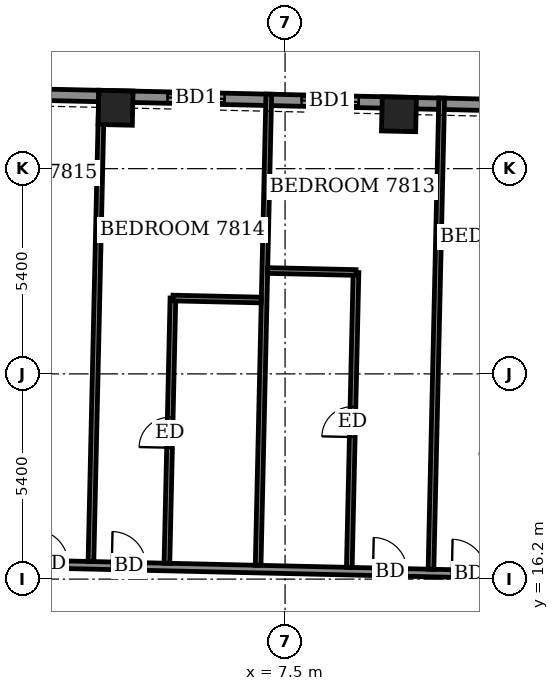
"""IFC4 building model, lengths in metres.
Left out: names, types, materials, properties, quantities, classifications, styles, units other than length and angle.
Written with IfcOpenShell. Run it as: python <this file> out.ifc"""

import sys

from ifc_helpers import new_model, si_unit, direction, frame, frame_2d, origin, origin_2d, place, context, subcontext, project, spatial, rectangle, extrude, element, fill, save


model = new_model("IFC4")
c1 = context("Model", 3, precision=1e-05, world=origin(), true_north=direction((0.0, 1.0)))
c2 = subcontext(c1, "Body", "Model", "MODEL_VIEW")
j1 = project(units=[si_unit("LENGTHUNIT", "METRE"), si_unit("PLANEANGLEUNIT", "RADIAN")], contexts=[c1])
p1 = place(None, origin())
s1 = spatial("IfcSite", under=j1, at=p1, CompositionType="ELEMENT")
p2 = place(p1, origin())
s2 = spatial("IfcBuilding", under=s1, at=p2, CompositionType="ELEMENT")
p3 = place(p2, frame((0.0, 0.0, 306.1)))
s3 = spatial("IfcBuildingStorey", under=s2, at=p3, CompositionType="ELEMENT", Elevation=306.1)
for number, where, z_axis, x_axis in (
    (1, (10.497, 28.432, -0.55), (0.0, 0.0, 1.0), (-1.0, 0.023, 0.0)),
    (2, (3.041, 28.602, -0.55), (0.0, 0.0, 1.0), (-1.0, 0.023, 0.0)),
):
    element("IfcColumn", number, at=place(p3, frame(where, z_axis=z_axis, x_axis=x_axis)), inside=s3, PredefinedType="COLUMN", context=c2, shape_type="SweptSolid", body=[
        extrude(rectangle(XDim=0.9, YDim=0.9, at=origin_2d()), origin(), (0.0, 0.0, 1.0), 3.6),
    ])
p4 = place(p3, frame((25.264, 28.397, 0.0), z_axis=(0.0, 0.0, 1.0), x_axis=(-0.999742391375, 0.022696935658, 0.0)))
e3 = element("IfcWall", 3, at=p4, inside=s3, PredefinedType="SOLIDWALL", context=c2, shape_type="SweptSolid", body=[
    extrude(rectangle(XDim=51.9, YDim=0.3, at=frame_2d((25.95, 0.0))), origin(), (0.0, 0.0, 1.0), 2.5),
])
p5 = place(p4, frame((1.898, 0.0, 0.0)))
e4 = element("IfcOpeningElement", 4, at=p5, cuts=e3, PredefinedType="OPENING", context=c2, shape_type="SweptSolid", body=[
    extrude(rectangle(XDim=1.5, YDim=2.4, at=frame_2d((0.75, 1.2))), frame((0.0, 0.16, 0.0), z_axis=(0.0, -1.0, 0.0), x_axis=(1.0, 0.0, 0.0)), (0.0, 0.0, 1.0), 0.32),
])
p6 = place(p4, frame((5.229, 0.0, 0.0)))
e5 = element("IfcOpeningElement", 5, at=p6, cuts=e3, PredefinedType="OPENING", context=c2, shape_type="SweptSolid", body=[
    extrude(rectangle(XDim=1.5, YDim=2.4, at=frame_2d((0.75, 1.2))), frame((0.0, 0.16, 0.0), z_axis=(0.0, -1.0, 0.0), x_axis=(1.0, 0.0, 0.0)), (0.0, 0.0, 1.0), 0.32),
])
p7 = place(p4, frame((10.7, 0.0, 0.0)))
e6 = element("IfcOpeningElement", 6, at=p7, cuts=e3, PredefinedType="OPENING", context=c2, shape_type="SweptSolid", body=[
    extrude(rectangle(XDim=1.5, YDim=2.4, at=frame_2d((0.75, 1.2))), frame((0.0, 0.16, 0.0), z_axis=(0.0, -1.0, 0.0), x_axis=(1.0, 0.0, 0.0)), (0.0, 0.0, 1.0), 0.32),
])
p8 = place(p4, frame((15.832, 0.0, 0.0)))
e7 = element("IfcOpeningElement", 7, at=p8, cuts=e3, PredefinedType="OPENING", context=c2, shape_type="SweptSolid", body=[
    extrude(rectangle(XDim=1.5, YDim=2.4, at=frame_2d((0.75, 1.2))), frame((0.0, 0.16, 0.0), z_axis=(0.0, -1.0, 0.0), x_axis=(1.0, 0.0, 0.0)), (0.0, 0.0, 1.0), 0.32),
])
p9 = place(p4, frame((19.361, 0.0, 0.0)))
e8 = element("IfcOpeningElement", 8, at=p9, cuts=e3, PredefinedType="OPENING", context=c2, shape_type="SweptSolid", body=[
    extrude(rectangle(XDim=1.5, YDim=2.4, at=frame_2d((0.75, 1.2))), frame((0.0, 0.16, 0.0), z_axis=(0.0, -1.0, 0.0), x_axis=(1.0, 0.0, 0.0)), (0.0, 0.0, 1.0), 0.32),
])
p10 = place(p4, frame((24.1, 0.0, 0.0)))
e9 = element("IfcOpeningElement", 9, at=p10, cuts=e3, PredefinedType="OPENING", context=c2, shape_type="SweptSolid", body=[
    extrude(rectangle(XDim=1.5, YDim=2.4, at=frame_2d((0.75, 1.2))), frame((0.0, 0.16, 0.0), z_axis=(0.0, -1.0, 0.0), x_axis=(1.0, 0.0, 0.0)), (0.0, 0.0, 1.0), 0.32),
])
p11 = place(p4, frame((27.539, 0.0, 0.0)))
e10 = element("IfcOpeningElement", 10, at=p11, cuts=e3, PredefinedType="OPENING", context=c2, shape_type="SweptSolid", body=[
    extrude(rectangle(XDim=1.5, YDim=2.4, at=frame_2d((0.75, 1.2))), frame((0.0, 0.16, 0.0), z_axis=(0.0, -1.0, 0.0), x_axis=(1.0, 0.0, 0.0)), (0.0, 0.0, 1.0), 0.32),
])
p12 = place(p4, frame((33.6, 0.0, 0.0)))
e11 = element("IfcOpeningElement", 11, at=p12, cuts=e3, PredefinedType="OPENING", context=c2, shape_type="SweptSolid", body=[
    extrude(rectangle(XDim=1.5, YDim=2.4, at=frame_2d((0.75, 1.2))), frame((0.0, 0.16, 0.0), z_axis=(0.0, -1.0, 0.0), x_axis=(1.0, 0.0, 0.0)), (0.0, 0.0, 1.0), 0.32),
])
p13 = place(p4, frame((38.643, 0.0, 0.0)))
e12 = element("IfcOpeningElement", 12, at=p13, cuts=e3, PredefinedType="OPENING", context=c2, shape_type="SweptSolid", body=[
    extrude(rectangle(XDim=1.5, YDim=2.4, at=frame_2d((0.75, 1.2))), frame((0.0, 0.16, 0.0), z_axis=(0.0, -1.0, 0.0), x_axis=(1.0, 0.0, 0.0)), (0.0, 0.0, 1.0), 0.32),
])
p14 = place(p4, frame((42.171, 0.0, 0.0)))
e13 = element("IfcOpeningElement", 13, at=p14, cuts=e3, PredefinedType="OPENING", context=c2, shape_type="SweptSolid", body=[
    extrude(rectangle(XDim=1.5, YDim=2.4, at=frame_2d((0.75, 1.2))), frame((0.0, 0.16, 0.0), z_axis=(0.0, -1.0, 0.0), x_axis=(1.0, 0.0, 0.0)), (0.0, 0.0, 1.0), 0.32),
])
p15 = place(p4, frame((47.637, 0.0, 0.9)))
e14 = element("IfcOpeningElement", 14, at=p15, cuts=e3, PredefinedType="OPENING", context=c2, shape_type="SweptSolid", body=[
    extrude(rectangle(XDim=2.4, YDim=1.5, at=frame_2d((1.2, 0.75))), frame((0.0, 0.16, 0.0), z_axis=(0.0, -1.0, 0.0), x_axis=(1.0, 0.0, 0.0)), (0.0, 0.0, 1.0), 0.32),
])
p16 = place(p3, frame((-30.652, 17.313, 0.0), z_axis=(0.0, 0.0, 1.0), x_axis=(0.999742623764, -0.02268669719, 0.0)))
e15 = element("IfcWall", 15, at=p16, inside=s3, PredefinedType="PARTITIONING", context=c2, shape_type="SweptSolid", body=[
    extrude(rectangle(XDim=58.8, YDim=0.2, at=frame_2d((29.4, 0.0))), origin(), (0.0, 0.0, 1.0), 3.05),
])
p17 = place(p16, frame((54.601, 0.0, 0.0)))
e16 = element("IfcOpeningElement", 16, at=p17, cuts=e15, PredefinedType="OPENING", context=c2, shape_type="SweptSolid", body=[
    extrude(rectangle(XDim=1.0, YDim=2.1, at=frame_2d((0.5, 1.05))), frame((0.0, 0.11, 0.0), z_axis=(0.0, -1.0, 0.0), x_axis=(1.0, 0.0, 0.0)), (0.0, 0.0, 1.0), 0.22),
])
p18 = place(p16, frame((49.35, 0.0, 0.0)))
e17 = element("IfcOpeningElement", 17, at=p18, cuts=e15, PredefinedType="OPENING", context=c2, shape_type="SweptSolid", body=[
    extrude(rectangle(XDim=0.9, YDim=2.1, at=frame_2d((0.45, 1.05))), frame((0.0, 0.11, 0.0), z_axis=(0.0, -1.0, 0.0), x_axis=(1.0, 0.0, 0.0)), (0.0, 0.0, 1.0), 0.22),
])
p19 = place(p16, frame((42.55, 0.0, 0.0)))
e18 = element("IfcOpeningElement", 18, at=p19, cuts=e15, PredefinedType="OPENING", context=c2, shape_type="SweptSolid", body=[
    extrude(rectangle(XDim=0.9, YDim=2.1, at=frame_2d((0.45, 1.05))), frame((0.0, 0.11, 0.0), z_axis=(0.0, -1.0, 0.0), x_axis=(1.0, 0.0, 0.0)), (0.0, 0.0, 1.0), 0.22),
])
p20 = place(p16, frame((40.475, 0.0, 0.0)))
e19 = element("IfcOpeningElement", 19, at=p20, cuts=e15, PredefinedType="OPENING", context=c2, shape_type="SweptSolid", body=[
    extrude(rectangle(XDim=0.9, YDim=2.1, at=frame_2d((0.45, 1.05))), frame((0.0, 0.11, 0.0), z_axis=(0.0, -1.0, 0.0), x_axis=(1.0, 0.0, 0.0)), (0.0, 0.0, 1.0), 0.22),
])
p21 = place(p16, frame((33.6, 0.0, 0.0)))
e20 = element("IfcOpeningElement", 20, at=p21, cuts=e15, PredefinedType="OPENING", context=c2, shape_type="SweptSolid", body=[
    extrude(rectangle(XDim=0.9, YDim=2.1, at=frame_2d((0.45, 1.05))), frame((0.0, 0.11, 0.0), z_axis=(0.0, -1.0, 0.0), x_axis=(1.0, 0.0, 0.0)), (0.0, 0.0, 1.0), 0.22),
])
p22 = place(p16, frame((31.55, 0.0, 0.0)))
e21 = element("IfcOpeningElement", 21, at=p22, cuts=e15, PredefinedType="OPENING", context=c2, shape_type="SweptSolid", body=[
    extrude(rectangle(XDim=0.9, YDim=2.1, at=frame_2d((0.45, 1.05))), frame((0.0, 0.11, 0.0), z_axis=(0.0, -1.0, 0.0), x_axis=(1.0, 0.0, 0.0)), (0.0, 0.0, 1.0), 0.22),
])
p23 = place(p16, frame((24.425, 0.0, 0.0)))
e22 = element("IfcOpeningElement", 22, at=p23, cuts=e15, PredefinedType="OPENING", context=c2, shape_type="SweptSolid", body=[
    extrude(rectangle(XDim=0.9, YDim=2.1, at=frame_2d((0.45, 1.05))), frame((0.0, 0.11, 0.0), z_axis=(0.0, -1.0, 0.0), x_axis=(1.0, 0.0, 0.0)), (0.0, 0.0, 1.0), 0.22),
])
p24 = place(p16, frame((22.05, 0.0, 0.0)))
e23 = element("IfcOpeningElement", 23, at=p24, cuts=e15, PredefinedType="OPENING", context=c2, shape_type="SweptSolid", body=[
    extrude(rectangle(XDim=0.9, YDim=2.1, at=frame_2d((0.45, 1.05))), frame((0.0, 0.11, 0.0), z_axis=(0.0, -1.0, 0.0), x_axis=(1.0, 0.0, 0.0)), (0.0, 0.0, 1.0), 0.22),
])
p25 = place(p16, frame((14.95, 0.0, 0.0)))
e24 = element("IfcOpeningElement", 24, at=p25, cuts=e15, PredefinedType="OPENING", context=c2, shape_type="SweptSolid", body=[
    extrude(rectangle(XDim=0.9, YDim=2.1, at=frame_2d((0.45, 1.05))), frame((0.0, 0.11, 0.0), z_axis=(0.0, -1.0, 0.0), x_axis=(1.0, 0.0, 0.0)), (0.0, 0.0, 1.0), 0.22),
])
p26 = place(p16, frame((12.525, 0.0, 0.0)))
e25 = element("IfcOpeningElement", 25, at=p26, cuts=e15, PredefinedType="OPENING", context=c2, shape_type="SweptSolid", body=[
    extrude(rectangle(XDim=0.9, YDim=2.1, at=frame_2d((0.45, 1.05))), frame((0.0, 0.11, 0.0), z_axis=(0.0, -1.0, 0.0), x_axis=(1.0, 0.0, 0.0)), (0.0, 0.0, 1.0), 0.22),
])
p27 = place(p16, frame((4.032, 0.0, 0.0)))
e26 = element("IfcOpeningElement", 26, at=p27, cuts=e15, PredefinedType="OPENING", context=c2, shape_type="SweptSolid", body=[
    extrude(rectangle(XDim=1.0, YDim=2.1, at=frame_2d((0.5, 1.05))), frame((0.0, 0.11, 0.0), z_axis=(0.0, -1.0, 0.0), x_axis=(1.0, 0.0, 0.0)), (0.0, 0.0, 1.0), 0.22),
])
p28 = place(p3, frame((2.392, 16.663, 0.0), z_axis=(0.0, 0.0, 1.0), x_axis=(0.022661475803, 0.999743195783, 0.0)))
e27 = element("IfcWall", 27, at=p28, inside=s3, PredefinedType="PARTITIONING", context=c2, shape_type="SweptSolid", body=[
    extrude(rectangle(XDim=12.4, YDim=0.15, at=frame_2d((6.2, 0.0))), origin(), (0.0, 0.0, 1.0), 2.5),
])
p29 = place(p3, frame((4.391, 16.618, 0.0), z_axis=(0.0, 0.0, 1.0), x_axis=(0.022630826984, 0.999743890039, 0.0)))
e28 = element("IfcWall", 28, at=p29, inside=s3, PredefinedType="PARTITIONING", context=c2, shape_type="SweptSolid", body=[
    extrude(rectangle(XDim=6.98, YDim=0.15, at=frame_2d((3.49, 0.0))), origin(), (0.0, 0.0, 1.0), 3.05),
])
p30 = place(p29, frame((3.04, 0.0, 0.0)))
e29 = element("IfcOpeningElement", 29, at=p30, cuts=e28, PredefinedType="OPENING", context=c2, shape_type="SweptSolid", body=[
    extrude(rectangle(XDim=0.8, YDim=2.1, at=frame_2d((0.4, 1.05))), frame((0.0, 0.085, 0.0), z_axis=(0.0, -1.0, 0.0), x_axis=(1.0, 0.0, 0.0)), (0.0, 0.0, 1.0), 0.17),
])
p31 = place(p3, frame((6.791, 16.563, 0.0), z_axis=(0.0, 0.0, 1.0), x_axis=(0.022661475803, 0.999743195783, 0.0)))
e30 = element("IfcWall", 30, at=p31, inside=s3, PredefinedType="PARTITIONING", context=c2, shape_type="SweptSolid", body=[
    extrude(rectangle(XDim=12.4, YDim=0.15, at=frame_2d((6.2, 0.0))), origin(), (0.0, 0.0, 1.0), 2.5),
])
p32 = place(p3, frame((9.19, 16.509, 0.0), z_axis=(0.0, 0.0, 1.0), x_axis=(0.022683528451, 0.999742695666, 0.0)))
e31 = element("IfcWall", 31, at=p32, inside=s3, PredefinedType="PARTITIONING", context=c2, shape_type="SweptSolid", body=[
    extrude(rectangle(XDim=7.76, YDim=0.15, at=frame_2d((3.88, 0.0))), origin(), (0.0, 0.0, 1.0), 3.05),
])
p33 = place(p32, frame((3.43, 0.0, 0.0)))
e32 = element("IfcOpeningElement", 32, at=p33, cuts=e31, PredefinedType="OPENING", context=c2, shape_type="SweptSolid", body=[
    extrude(rectangle(XDim=0.8, YDim=2.1, at=frame_2d((0.4, 1.05))), frame((0.0, 0.085, 0.0), z_axis=(0.0, -1.0, 0.0), x_axis=(1.0, 0.0, 0.0)), (0.0, 0.0, 1.0), 0.17),
])
p34 = place(p3, frame((11.339, 16.46, 0.0), z_axis=(0.0, 0.0, 1.0), x_axis=(0.022740189192, 0.999741408463, 0.0)))
e33 = element("IfcWall", 33, at=p34, inside=s3, PredefinedType="PARTITIONING", context=c2, shape_type="SweptSolid", body=[
    extrude(rectangle(XDim=12.4, YDim=0.15, at=frame_2d((6.2, 0.0))), origin(), (0.0, 0.0, 1.0), 2.5),
])
p35 = place(p3, frame((4.549, 23.596, 0.0), z_axis=(0.0, 0.0, 1.0), x_axis=(0.999740478815, -0.022781023197, 0.0)))
e34 = element("IfcWall", 34, at=p35, inside=s3, PredefinedType="PARTITIONING", context=c2, shape_type="SweptSolid", body=[
    extrude(rectangle(XDim=2.325, YDim=0.15, at=frame_2d((1.163, 0.0))), origin(), (0.0, 0.0, 1.0), 3.05),
])
p36 = place(p3, frame((7.042, 24.32, 0.0), z_axis=(0.0, 0.0, 1.0), x_axis=(0.999740260747, -0.02279059109, 0.0)))
e35 = element("IfcWall", 35, at=p36, inside=s3, PredefinedType="PARTITIONING", context=c2, shape_type="SweptSolid", body=[
    extrude(rectangle(XDim=2.324, YDim=0.15, at=frame_2d((1.162, 0.0))), origin(), (0.0, 0.0, 1.0), 3.05),
])
p37 = place(p8, origin())
e36 = element("IfcDoor", 36, at=p37, inside=s3, OperationType="SLIDING_TO_LEFT", PredefinedType="DOOR", context=c2, shape_type="SweptSolid", body=[
    extrude(rectangle(XDim=1.5, YDim=2.4, at=frame_2d((0.75, 1.2))), frame((0.0, 0.025, 0.0), z_axis=(0.0, -1.0, 0.0), x_axis=(1.0, 0.0, 0.0)), (0.0, 0.0, 1.0), 0.05),
])
fill(e7, e36)
p38 = place(p9, origin())
e37 = element("IfcDoor", 37, at=p38, inside=s3, OperationType="SLIDING_TO_LEFT", PredefinedType="DOOR", context=c2, shape_type="SweptSolid", body=[
    extrude(rectangle(XDim=1.5, YDim=2.4, at=frame_2d((0.75, 1.2))), frame((0.0, 0.025, 0.0), z_axis=(0.0, -1.0, 0.0), x_axis=(1.0, 0.0, 0.0)), (0.0, 0.0, 1.0), 0.05),
])
fill(e8, e37)
p39 = place(p19, origin())
e38 = element("IfcDoor", 38, at=p39, inside=s3, OperationType="SINGLE_SWING_RIGHT", PredefinedType="DOOR", context=c2, shape_type="SweptSolid", body=[
    extrude(rectangle(XDim=0.9, YDim=2.1, at=frame_2d((0.45, 1.05))), frame((0.0, 0.025, 0.0), z_axis=(0.0, -1.0, 0.0), x_axis=(1.0, 0.0, 0.0)), (0.0, 0.0, 1.0), 0.05),
])
fill(e18, e38)
p40 = place(p20, origin())
e39 = element("IfcDoor", 39, at=p40, inside=s3, OperationType="SINGLE_SWING_LEFT", PredefinedType="DOOR", context=c2, shape_type="SweptSolid", body=[
    extrude(rectangle(XDim=0.9, YDim=2.1, at=frame_2d((0.45, 1.05))), frame((0.0, 0.025, 0.0), z_axis=(0.0, -1.0, 0.0), x_axis=(1.0, 0.0, 0.0)), (0.0, 0.0, 1.0), 0.05),
])
fill(e19, e39)
p41 = place(p33, origin())
e40 = element("IfcDoor", 40, at=p41, inside=s3, OperationType="SINGLE_SWING_LEFT", PredefinedType="DOOR", context=c2, shape_type="SweptSolid", body=[
    extrude(rectangle(XDim=0.8, YDim=2.1, at=frame_2d((0.4, 1.05))), frame((0.0, 0.025, 0.0), z_axis=(0.0, -1.0, 0.0), x_axis=(1.0, 0.0, 0.0)), (0.0, 0.0, 1.0), 0.05),
])
fill(e32, e40)
p42 = place(p21, origin())
e41 = element("IfcDoor", 41, at=p42, inside=s3, OperationType="SINGLE_SWING_RIGHT", PredefinedType="DOOR", context=c2, shape_type="SweptSolid", body=[
    extrude(rectangle(XDim=0.9, YDim=2.1, at=frame_2d((0.45, 1.05))), frame((0.0, 0.025, 0.0), z_axis=(0.0, -1.0, 0.0), x_axis=(1.0, 0.0, 0.0)), (0.0, 0.0, 1.0), 0.05),
])
fill(e20, e41)
p43 = place(p30, origin())
e42 = element("IfcDoor", 42, at=p43, inside=s3, OperationType="SINGLE_SWING_RIGHT", PredefinedType="DOOR", context=c2, shape_type="SweptSolid", body=[
    extrude(rectangle(XDim=0.8, YDim=2.1, at=frame_2d((0.4, 1.05))), frame((0.0, 0.025, 0.0), z_axis=(0.0, -1.0, 0.0), x_axis=(1.0, 0.0, 0.0)), (0.0, 0.0, 1.0), 0.05),
])
fill(e29, e42)
p44 = place(p22, origin())
e43 = element("IfcDoor", 43, at=p44, inside=s3, OperationType="SINGLE_SWING_LEFT", PredefinedType="DOOR", context=c2, shape_type="SweptSolid", body=[
    extrude(rectangle(XDim=0.9, YDim=2.1, at=frame_2d((0.45, 1.05))), frame((0.0, 0.025, 0.0), z_axis=(0.0, -1.0, 0.0), x_axis=(1.0, 0.0, 0.0)), (0.0, 0.0, 1.0), 0.05),
])
fill(e21, e43)
save(model, sys.argv[1])
